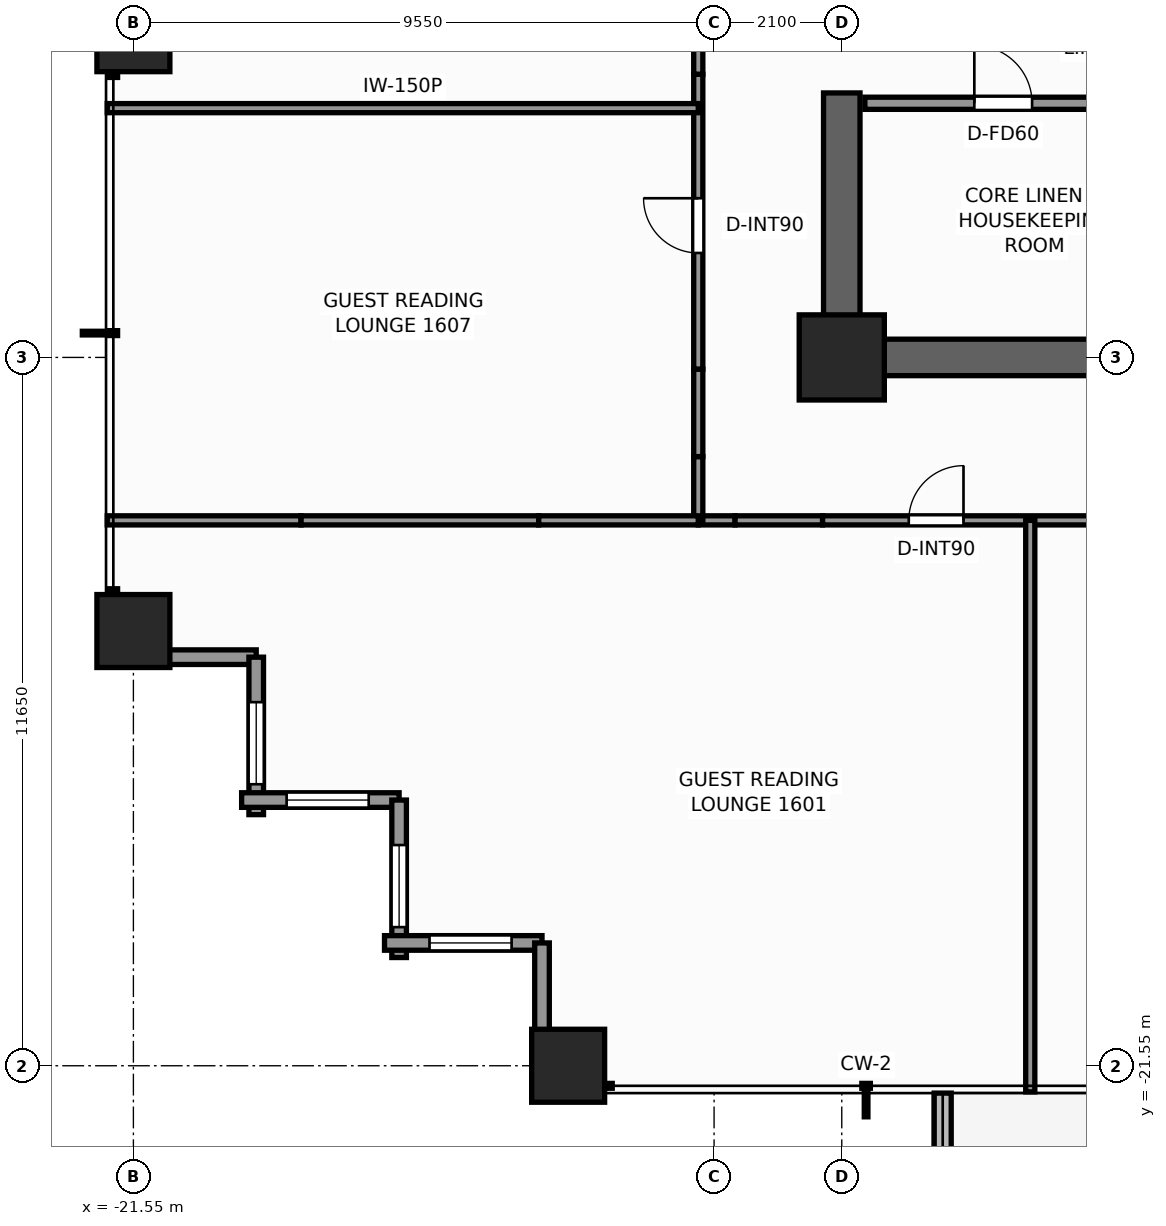
"""IFC4 building model, lengths in metres.
Left out: names, types, materials, properties, quantities, classifications, styles, units other than length and angle.
Written with IfcOpenShell. Run it as: python <this file> out.ifc"""

import sys

from ifc_helpers import new_model, si_unit, direction, frame, frame_2d, origin, origin_2d, place, context, subcontext, project, spatial, rectangle, extrude, element, fill, save


model = new_model("IFC4")
c1 = context("Model", 3, precision=1e-05, world=origin(), true_north=direction((0.0, 1.0)))
c2 = subcontext(c1, "Body", "Model", "MODEL_VIEW")
j1 = project(units=[si_unit("LENGTHUNIT", "METRE"), si_unit("PLANEANGLEUNIT", "RADIAN")], contexts=[c1])
p1 = place(None, origin())
s1 = spatial("IfcSite", under=j1, at=p1, CompositionType="ELEMENT")
p2 = place(p1, origin())
s2 = spatial("IfcBuilding", under=s1, at=p2, CompositionType="ELEMENT")
p3 = place(p2, frame((0.0, 0.0, 56.8)))
s3 = spatial("IfcBuildingStorey", under=s2, at=p3, CompositionType="ELEMENT", Elevation=56.8)
p4 = place(p3, frame((-3.54, -9.9, 0.0), z_axis=(0.0, 0.0, 1.0), x_axis=(-1.0, 0.0, 0.0)))
e1 = element("IfcWall", 1, at=p4, inside=s3, PredefinedType="SHEAR", context=c2, shape_type="SweptSolid", body=[
    extrude(rectangle(XDim=6.66, YDim=0.6, at=frame_2d((3.33, 0.0))), origin(), (0.0, 0.0, 1.0), 3.3),
])
p5 = place(p3, frame((-9.9, -9.6, 0.0), z_axis=(0.0, 0.0, 1.0), x_axis=(0.0, 1.0, 0.0)))
e2 = element("IfcWall", 2, at=p5, inside=s3, PredefinedType="SHEAR", context=c2, shape_type="SweptSolid", body=[
    extrude(rectangle(XDim=4.05, YDim=0.6, at=frame_2d((2.025, 0.0))), origin(), (0.0, 0.0, 1.0), 3.3),
])
p6 = place(p3, frame((-9.9, -9.9, 0.0), z_axis=(0.0, 0.0, 1.0), x_axis=(1.0, 0.0, 0.0)))
e3 = element("IfcColumn", 3, at=p6, inside=s3, PredefinedType="COLUMN", context=c2, shape_type="SweptSolid", body=[
    extrude(rectangle(XDim=1.4, YDim=1.4, at=origin_2d()), origin(), (0.0, 0.0, 1.0), 3.3),
])
for number, where, z_axis, x_axis in (
    (4, (-14.4, -21.55, 0.0), (0.0, 0.0, 1.0), (1.0, 0.0, 0.0)),
    (5, (-21.55, -14.4, 0.0), (0.0, 0.0, 1.0), (1.0, 0.0, 0.0)),
    (6, (-21.55, -4.6, 0.0), (0.0, 0.0, 1.0), (1.0, 0.0, 0.0)),
):
    element("IfcColumn", number, at=place(p3, frame(where, z_axis=z_axis, x_axis=x_axis)), inside=s3, PredefinedType="COLUMN", context=c2, shape_type="SweptSolid", body=[
        extrude(rectangle(XDim=1.2, YDim=1.2, at=origin_2d()), origin(), (0.0, 0.0, 1.0), 3.3),
    ])
p7 = place(p3, frame((-8.24, -22.0, -0.06), z_axis=(0.0, 0.0, 1.0), x_axis=(0.0, -1.0, 0.0)))
e7 = element("IfcWall", 7, at=p7, inside=s3, PredefinedType="PARAPET", context=c2, shape_type="SweptSolid", body=[
    extrude(rectangle(XDim=2.674, YDim=0.28, at=frame_2d((1.337, 0.0))), origin(), (0.0, 0.0, 1.0), 0.42),
])
p8 = place(p3, frame((-19.53, -14.83, 0.0), z_axis=(0.0, 0.0, 1.0), x_axis=(-1.0, 0.0, 0.0)))
e8 = element("IfcWall", 8, at=p8, inside=s3, PredefinedType="STANDARD", context=c2, shape_type="SweptSolid", body=[
    extrude(rectangle(XDim=2.59, YDim=0.24, at=frame_2d((1.295, 0.0))), origin(), (0.0, 0.0, 1.0), 1.255),
])
p9 = place(p3, frame((-19.53, -17.42, 0.0), z_axis=(0.0, 0.0, 1.0), x_axis=(0.0, 1.0, 0.0)))
e9 = element("IfcWall", 9, at=p9, inside=s3, PredefinedType="STANDARD", context=c2, shape_type="SweptSolid", body=[
    extrude(rectangle(XDim=2.59, YDim=0.24, at=frame_2d((1.295, 0.0))), origin(), (0.0, 0.0, 1.0), 2.439),
])
p10 = place(p9, frame((0.5, 0.0, 0.65)))
e10 = element("IfcOpeningElement", 10, at=p10, cuts=e9, PredefinedType="OPENING", context=c2, shape_type="SweptSolid", body=[
    extrude(rectangle(XDim=1.35, YDim=1.55, at=frame_2d((0.675, 0.775))), frame((0.0, 0.13, 0.0), z_axis=(0.0, -1.0, 0.0), x_axis=(1.0, 0.0, 0.0)), (0.0, 0.0, 1.0), 0.26),
])
p11 = place(p3, frame((-17.18, -17.18, 0.0), z_axis=(0.0, 0.0, 1.0), x_axis=(-1.0, 0.0, 0.0)))
e11 = element("IfcWall", 11, at=p11, inside=s3, PredefinedType="STANDARD", context=c2, shape_type="SweptSolid", body=[
    extrude(rectangle(XDim=2.59, YDim=0.24, at=frame_2d((1.295, 0.0))), origin(), (0.0, 0.0, 1.0), 2.439),
])
p12 = place(p11, frame((0.5, 0.0, 0.65)))
e12 = element("IfcOpeningElement", 12, at=p12, cuts=e11, PredefinedType="OPENING", context=c2, shape_type="SweptSolid", body=[
    extrude(rectangle(XDim=1.35, YDim=1.55, at=frame_2d((0.675, 0.775))), frame((0.0, 0.13, 0.0), z_axis=(0.0, -1.0, 0.0), x_axis=(1.0, 0.0, 0.0)), (0.0, 0.0, 1.0), 0.26),
])
p13 = place(p3, frame((-17.18, -19.77, 0.0), z_axis=(0.0, 0.0, 1.0), x_axis=(0.0, 1.0, 0.0)))
e13 = element("IfcWall", 13, at=p13, inside=s3, PredefinedType="STANDARD", context=c2, shape_type="SweptSolid", body=[
    extrude(rectangle(XDim=2.59, YDim=0.24, at=frame_2d((1.295, 0.0))), origin(), (0.0, 0.0, 1.0), 2.439),
])
p14 = place(p13, frame((0.5, 0.0, 0.65)))
e14 = element("IfcOpeningElement", 14, at=p14, cuts=e13, PredefinedType="OPENING", context=c2, shape_type="SweptSolid", body=[
    extrude(rectangle(XDim=1.35, YDim=1.55, at=frame_2d((0.675, 0.775))), frame((0.0, 0.13, 0.0), z_axis=(0.0, -1.0, 0.0), x_axis=(1.0, 0.0, 0.0)), (0.0, 0.0, 1.0), 0.26),
])
p15 = place(p3, frame((-14.83, -19.53, 0.0), z_axis=(0.0, 0.0, 1.0), x_axis=(-1.0, 0.0, 0.0)))
e15 = element("IfcWall", 15, at=p15, inside=s3, PredefinedType="STANDARD", context=c2, shape_type="SweptSolid", body=[
    extrude(rectangle(XDim=2.59, YDim=0.24, at=frame_2d((1.295, 0.0))), origin(), (0.0, 0.0, 1.0), 2.439),
])
p16 = place(p15, frame((0.5, 0.0, 0.65)))
e16 = element("IfcOpeningElement", 16, at=p16, cuts=e15, PredefinedType="OPENING", context=c2, shape_type="SweptSolid", body=[
    extrude(rectangle(XDim=1.35, YDim=1.55, at=frame_2d((0.675, 0.775))), frame((0.0, 0.13, 0.0), z_axis=(0.0, -1.0, 0.0), x_axis=(1.0, 0.0, 0.0)), (0.0, 0.0, 1.0), 0.26),
])
p17 = place(p3, frame((-14.83, -22.12, 0.0), z_axis=(0.0, 0.0, 1.0), x_axis=(0.0, 1.0, 0.0)))
e17 = element("IfcWall", 17, at=p17, inside=s3, PredefinedType="STANDARD", context=c2, shape_type="SweptSolid", body=[
    extrude(rectangle(XDim=2.59, YDim=0.24, at=frame_2d((1.295, 0.0))), origin(), (0.0, 0.0, 1.0), 1.255),
])
p18 = place(p3, frame((-9.52, -5.72, 0.0), z_axis=(0.0, 0.0, 1.0), x_axis=(1.0, 0.0, 0.0)))
e18 = element("IfcWall", 18, at=p18, inside=s3, PredefinedType="SOLIDWALL", context=c2, shape_type="SweptSolid", body=[
    extrude(rectangle(XDim=5.66, YDim=0.2, at=frame_2d((2.83, 0.0))), origin(), (0.0, 0.0, 1.0), 3.06),
])
p19 = place(p18, frame((1.8, 0.0, 0.0)))
e19 = element("IfcOpeningElement", 19, at=p19, cuts=e18, PredefinedType="OPENING", context=c2, shape_type="SweptSolid", body=[
    extrude(rectangle(XDim=0.95, YDim=2.06, at=frame_2d((0.475, 1.03))), frame((0.0, 0.11, 0.0), z_axis=(0.0, -1.0, 0.0), x_axis=(1.0, 0.0, 0.0)), (0.0, 0.0, 1.0), 0.22),
])
p20 = place(p3, frame((-12.26, -12.58, 0.0), z_axis=(0.0, 0.0, 1.0), x_axis=(1.0, 0.0, 0.0)))
e20 = element("IfcWall", 20, at=p20, inside=s3, PredefinedType="PARTITIONING", context=c2, shape_type="SweptSolid", body=[
    extrude(rectangle(XDim=0.605, YDim=0.15, at=frame_2d((0.303, 0.0))), origin(), (0.0, 0.0, 1.0), 3.06),
])
p21 = place(p3, frame((-11.655, -12.58, 0.0), z_axis=(0.0, 0.0, 1.0), x_axis=(1.0, 0.0, 0.0)))
e21 = element("IfcWall", 21, at=p21, inside=s3, PredefinedType="PARTITIONING", context=c2, shape_type="SweptSolid", body=[
    extrude(rectangle(XDim=1.439, YDim=0.15, at=frame_2d((0.72, 0.0))), origin(), (0.0, 0.0, 1.0), 1.245),
])
p22 = place(p3, frame((-10.216, -12.58, 0.0), z_axis=(0.0, 0.0, 1.0), x_axis=(1.0, 0.0, 0.0)))
e22 = element("IfcWall", 22, at=p22, inside=s3, PredefinedType="PARTITIONING", context=c2, shape_type="SweptSolid", body=[
    extrude(rectangle(XDim=4.974, YDim=0.15, at=frame_2d((2.487, 0.0))), origin(), (0.0, 0.0, 1.0), 3.06),
])
p23 = place(p22, frame((1.417, 0.0, 0.0)))
e23 = element("IfcOpeningElement", 23, at=p23, cuts=e22, PredefinedType="OPENING", context=c2, shape_type="SweptSolid", body=[
    extrude(rectangle(XDim=0.9, YDim=2.06, at=frame_2d((0.45, 1.03))), frame((0.0, 0.085, 0.0), z_axis=(0.0, -1.0, 0.0), x_axis=(1.0, 0.0, 0.0)), (0.0, 0.0, 1.0), 0.17),
])
p24 = place(p3, frame((-12.26, -12.58, 0.0), z_axis=(0.0, 0.0, 1.0), x_axis=(0.0, 1.0, 0.0)))
e24 = element("IfcWall", 24, at=p24, inside=s3, PredefinedType="PARTITIONING", context=c2, shape_type="SweptSolid", body=[
    extrude(rectangle(XDim=1.049, YDim=0.15, at=frame_2d((0.524, 0.0))), origin(), (0.0, 0.0, 1.0), 3.06),
])
p25 = place(p3, frame((-12.26, -11.531, 0.0), z_axis=(0.0, 0.0, 1.0), x_axis=(0.0, 1.0, 0.0)))
e25 = element("IfcWall", 25, at=p25, inside=s3, PredefinedType="PARTITIONING", context=c2, shape_type="SweptSolid", body=[
    extrude(rectangle(XDim=1.439, YDim=0.15, at=frame_2d((0.72, 0.0))), origin(), (0.0, 0.0, 1.0), 1.245),
])
p26 = place(p3, frame((-12.26, -10.092, 0.0), z_axis=(0.0, 0.0, 1.0), x_axis=(0.0, 1.0, 0.0)))
e26 = element("IfcWall", 26, at=p26, inside=s3, PredefinedType="PARTITIONING", context=c2, shape_type="SweptSolid", body=[
    extrude(rectangle(XDim=4.85, YDim=0.15, at=frame_2d((2.425, 0.0))), origin(), (0.0, 0.0, 1.0), 3.06),
])
p27 = place(p26, frame((1.91, 0.0, 0.0)))
e27 = element("IfcOpeningElement", 27, at=p27, cuts=e26, PredefinedType="OPENING", context=c2, shape_type="SweptSolid", body=[
    extrude(rectangle(XDim=0.9, YDim=2.06, at=frame_2d((0.45, 1.03))), frame((0.0, 0.085, 0.0), z_axis=(0.0, -1.0, 0.0), x_axis=(1.0, 0.0, 0.0)), (0.0, 0.0, 1.0), 0.17),
])
p28 = place(p3, frame((-12.26, -5.242, 0.0), z_axis=(0.0, 0.0, 1.0), x_axis=(0.0, 1.0, 0.0)))
e28 = element("IfcWall", 28, at=p28, inside=s3, PredefinedType="PARTITIONING", context=c2, shape_type="SweptSolid", body=[
    extrude(rectangle(XDim=1.284, YDim=0.15, at=frame_2d((0.642, 0.0))), origin(), (0.0, 0.0, 1.0), 1.245),
])
p29 = place(p3, frame((-21.98, -12.58, 0.0), z_axis=(0.0, 0.0, 1.0), x_axis=(1.0, 0.0, 0.0)))
e29 = element("IfcWall", 29, at=p29, inside=s3, PredefinedType="PARTITIONING", context=c2, shape_type="SweptSolid", body=[
    extrude(rectangle(XDim=3.188, YDim=0.15, at=frame_2d((1.594, 0.0))), origin(), (0.0, 0.0, 1.0), 2.429),
])
p30 = place(p3, frame((-18.792, -12.58, 0.0), z_axis=(0.0, 0.0, 1.0), x_axis=(1.0, 0.0, 0.0)))
e30 = element("IfcWall", 30, at=p30, inside=s3, PredefinedType="PARTITIONING", context=c2, shape_type="SweptSolid", body=[
    extrude(rectangle(XDim=3.907, YDim=0.15, at=frame_2d((1.954, 0.0))), origin(), (0.0, 0.0, 1.0), 1.245),
])
p31 = place(p3, frame((-14.885, -12.58, 0.0), z_axis=(0.0, 0.0, 1.0), x_axis=(1.0, 0.0, 0.0)))
e31 = element("IfcWall", 31, at=p31, inside=s3, PredefinedType="PARTITIONING", context=c2, shape_type="SweptSolid", body=[
    extrude(rectangle(XDim=2.625, YDim=0.15, at=frame_2d((1.312, 0.0))), origin(), (0.0, 0.0, 1.0), 3.06),
])
p32 = place(p3, frame((-6.8, -21.98, 0.0), z_axis=(0.0, 0.0, 1.0), x_axis=(0.0, 1.0, 0.0)))
e32 = element("IfcWall", 32, at=p32, inside=s3, PredefinedType="PARTITIONING", context=c2, shape_type="SweptSolid", body=[
    extrude(rectangle(XDim=9.4, YDim=0.15, at=frame_2d((4.7, 0.0))), origin(), (0.0, 0.0, 1.0), 2.429),
])
p33 = place(p3, frame((-21.98, -5.8, 0.0), z_axis=(0.0, 0.0, 1.0), x_axis=(1.0, 0.0, 0.0)))
e33 = element("IfcWall", 33, at=p33, inside=s3, PredefinedType="PARTITIONING", context=c2, shape_type="SweptSolid", body=[
    extrude(rectangle(XDim=9.72, YDim=0.15, at=frame_2d((4.86, 0.0))), origin(), (0.0, 0.0, 1.0), 2.429),
])
p34 = place(p10, origin())
e34 = element("IfcWindow", 34, at=p34, inside=s3, PartitioningType="SINGLE_PANEL", PredefinedType="WINDOW", context=c2, shape_type="SweptSolid", body=[
    extrude(rectangle(XDim=1.35, YDim=1.55, at=frame_2d((0.675, 0.775))), frame((0.0, 0.03, 0.0), z_axis=(0.0, -1.0, 0.0), x_axis=(1.0, 0.0, 0.0)), (0.0, 0.0, 1.0), 0.06),
])
fill(e10, e34)
p35 = place(p12, origin())
e35 = element("IfcWindow", 35, at=p35, inside=s3, PartitioningType="SINGLE_PANEL", PredefinedType="WINDOW", context=c2, shape_type="SweptSolid", body=[
    extrude(rectangle(XDim=1.35, YDim=1.55, at=frame_2d((0.675, 0.775))), frame((0.0, 0.03, 0.0), z_axis=(0.0, -1.0, 0.0), x_axis=(1.0, 0.0, 0.0)), (0.0, 0.0, 1.0), 0.06),
])
fill(e12, e35)
p36 = place(p14, origin())
e36 = element("IfcWindow", 36, at=p36, inside=s3, PartitioningType="SINGLE_PANEL", PredefinedType="WINDOW", context=c2, shape_type="SweptSolid", body=[
    extrude(rectangle(XDim=1.35, YDim=1.55, at=frame_2d((0.675, 0.775))), frame((0.0, 0.03, 0.0), z_axis=(0.0, -1.0, 0.0), x_axis=(1.0, 0.0, 0.0)), (0.0, 0.0, 1.0), 0.06),
])
fill(e14, e36)
p37 = place(p16, origin())
e37 = element("IfcWindow", 37, at=p37, inside=s3, PartitioningType="SINGLE_PANEL", PredefinedType="WINDOW", context=c2, shape_type="SweptSolid", body=[
    extrude(rectangle(XDim=1.35, YDim=1.55, at=frame_2d((0.675, 0.775))), frame((0.0, 0.03, 0.0), z_axis=(0.0, -1.0, 0.0), x_axis=(1.0, 0.0, 0.0)), (0.0, 0.0, 1.0), 0.06),
])
fill(e16, e37)
p38 = place(p19, origin())
e38 = element("IfcDoor", 38, at=p38, inside=s3, OperationType="SINGLE_SWING_LEFT", PredefinedType="DOOR", context=c2, shape_type="SweptSolid", body=[
    extrude(rectangle(XDim=0.95, YDim=2.06, at=frame_2d((0.475, 1.03))), frame((0.0, 0.025, 0.0), z_axis=(0.0, -1.0, 0.0), x_axis=(1.0, 0.0, 0.0)), (0.0, 0.0, 1.0), 0.05),
])
fill(e19, e38)
p39 = place(p23, origin())
e39 = element("IfcDoor", 39, at=p39, inside=s3, OperationType="SINGLE_SWING_RIGHT", PredefinedType="DOOR", context=c2, shape_type="SweptSolid", body=[
    extrude(rectangle(XDim=0.9, YDim=2.06, at=frame_2d((0.45, 1.03))), frame((0.0, 0.025, 0.0), z_axis=(0.0, -1.0, 0.0), x_axis=(1.0, 0.0, 0.0)), (0.0, 0.0, 1.0), 0.05),
])
fill(e23, e39)
p40 = place(p27, origin())
e40 = element("IfcDoor", 40, at=p40, inside=s3, OperationType="SINGLE_SWING_RIGHT", PredefinedType="DOOR", context=c2, shape_type="SweptSolid", body=[
    extrude(rectangle(XDim=0.9, YDim=2.06, at=frame_2d((0.45, 1.03))), frame((0.0, 0.025, 0.0), z_axis=(0.0, -1.0, 0.0), x_axis=(1.0, 0.0, 0.0)), (0.0, 0.0, 1.0), 0.05),
])
fill(e27, e40)
save(model, sys.argv[1])
